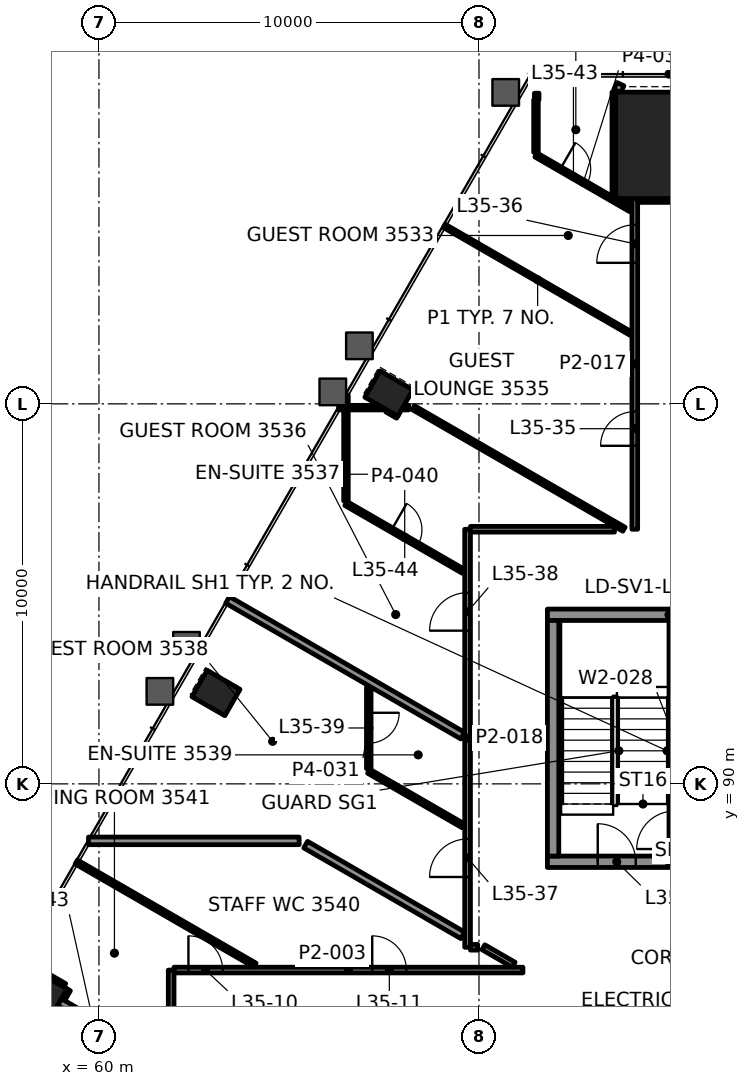
"""IFC4 building model, lengths in metres.
Left out: names, types, materials, properties, quantities, classifications, styles, units other than length and angle.
Written with IfcOpenShell. Run it as: python <this file> out.ifc"""

import sys

from ifc_helpers import new_model, si_unit, direction, frame, frame_2d, origin, origin_2d, place, context, subcontext, project, spatial, rectangle, hollow_rectangle, extrude, element, fill, save


model = new_model("IFC4")
c1 = context("Model", 3, precision=1e-05, world=origin(), true_north=direction((0.0, 1.0)))
c2 = subcontext(c1, "Body", "Model", "MODEL_VIEW")
j1 = project(units=[si_unit("LENGTHUNIT", "METRE"), si_unit("PLANEANGLEUNIT", "RADIAN")], contexts=[c1])
p1 = place(None, origin())
s1 = spatial("IfcSite", under=j1, at=p1, CompositionType="ELEMENT")
p2 = place(p1, origin())
s2 = spatial("IfcBuilding", under=s1, at=p2, CompositionType="ELEMENT")
p3 = place(p2, frame((0.0, 0.0, 155.8)))
s3 = spatial("IfcBuildingStorey", under=s2, at=p3, CompositionType="ELEMENT", Elevation=155.8)
p4 = place(p3, frame((75.0, 106.802, 0.0), z_axis=(0.0, 0.0, 1.0), x_axis=(-1.0, 0.0, 0.0)))
e1 = element("IfcColumn", 1, at=p4, inside=s3, PredefinedType="COLUMN", context=c2, shape_type="SweptSolid", body=[
    extrude(rectangle(XDim=2.8, YDim=2.8, at=origin_2d()), origin(), (0.0, 0.0, 1.0), 3.9),
])
for number, where, z_axis, x_axis in (
    (2, (67.629, 100.271, -0.0), (0.0, 0.0, 1.0), (-0.5, -0.866, 0.0)),
    (3, (63.079, 92.39, -0.0), (0.0, 0.0, 1.0), (-0.5, -0.866, 0.0)),
    (4, (58.53, 84.509, -0.0), (0.0, 0.0, 1.0), (-0.5, -0.866, 0.0)),
):
    element("IfcColumn", number, at=place(p3, frame(where, z_axis=z_axis, x_axis=x_axis)), inside=s3, PredefinedType="COLUMN", context=c2, shape_type="SweptSolid", body=[
        extrude(hollow_rectangle(XDim=0.8, YDim=1.0, WallThickness=0.05, at=origin_2d()), origin(), (0.0, 0.0, 1.0), 3.9),
    ])
p5 = place(p3, frame((71.8, 87.95, 0.0), z_axis=(0.0, 0.0, 1.0), x_axis=(1.0, 0.0, 0.0)))
e5 = element("IfcWall", 5, at=p5, inside=s3, PredefinedType="SHEAR", context=c2, shape_type="SweptSolid", body=[
    extrude(rectangle(XDim=6.4, YDim=0.3, at=frame_2d((3.2, 0.0))), origin(), (0.0, 0.0, 1.0), 3.7),
])
p6 = place(p5, frame((1.325, 0.0, 0.0)))
e6 = element("IfcOpeningElement", 6, at=p6, cuts=e5, PredefinedType="OPENING", context=c2, shape_type="SweptSolid", body=[
    extrude(rectangle(XDim=1.0, YDim=2.1, at=frame_2d((0.5, 1.05))), frame((0.0, 0.16, 0.0), z_axis=(0.0, -1.0, 0.0), x_axis=(1.0, 0.0, 0.0)), (0.0, 0.0, 1.0), 0.32),
])
p7 = place(p5, frame((4.125, 0.0, 0.0)))
e7 = element("IfcOpeningElement", 7, at=p7, cuts=e5, PredefinedType="OPENING", context=c2, shape_type="SweptSolid", body=[
    extrude(rectangle(XDim=1.2, YDim=2.1, at=frame_2d((0.6, 1.05))), frame((0.0, 0.16, 0.0), z_axis=(0.0, -1.0, 0.0), x_axis=(1.0, 0.0, 0.0)), (0.0, 0.0, 1.0), 0.32),
])
p8 = place(p3, frame((71.8, 94.45, 0.0), z_axis=(0.0, 0.0, 1.0), x_axis=(1.0, 0.0, 0.0)))
e8 = element("IfcWall", 8, at=p8, inside=s3, PredefinedType="SHEAR", context=c2, shape_type="SweptSolid", body=[
    extrude(rectangle(XDim=6.4, YDim=0.3, at=frame_2d((3.2, 0.0))), origin(), (0.0, 0.0, 1.0), 3.7),
])
p9 = place(p3, frame((71.95, 88.1, 0.0), z_axis=(0.0, 0.0, 1.0), x_axis=(0.0, 1.0, 0.0)))
e9 = element("IfcWall", 9, at=p9, inside=s3, PredefinedType="SHEAR", context=c2, shape_type="SweptSolid", body=[
    extrude(rectangle(XDim=6.2, YDim=0.3, at=frame_2d((3.1, 0.0))), origin(), (0.0, 0.0, 1.0), 3.7),
])
p10 = place(p3, frame((75.15, 88.1, 0.0), z_axis=(0.0, 0.0, 1.0), x_axis=(0.0, 1.0, 0.0)))
e10 = element("IfcWall", 10, at=p10, inside=s3, PredefinedType="SHEAR", context=c2, shape_type="SweptSolid", body=[
    extrude(rectangle(XDim=6.2, YDim=0.3, at=frame_2d((3.1, 0.0))), origin(), (0.0, 0.0, 1.0), 3.7),
])
p11 = place(p10, frame((0.185, 0.0, 0.0)))
e11 = element("IfcOpeningElement", 11, at=p11, cuts=e10, PredefinedType="OPENING", context=c2, shape_type="SweptSolid", body=[
    extrude(rectangle(XDim=1.0, YDim=2.1, at=frame_2d((0.5, 1.05))), frame((0.0, 0.16, 0.0), z_axis=(0.0, -1.0, 0.0), x_axis=(1.0, 0.0, 0.0)), (0.0, 0.0, 1.0), 0.32),
])
p12 = place(p3, frame((61.975, 85.1, 0.0), z_axis=(0.0, 0.0, 1.0), x_axis=(1.0, 0.0, 0.0)))
e12 = element("IfcWall", 12, at=p12, inside=s3, PredefinedType="PARTITIONING", context=c2, shape_type="SweptSolid", body=[
    extrude(rectangle(XDim=9.181, YDim=0.15, at=frame_2d((4.591, 0.0))), origin(), (0.0, 0.0, 1.0), 3.1),
])
p13 = place(p12, frame((0.38, 0.0, 0.0)))
e13 = element("IfcOpeningElement", 13, at=p13, cuts=e12, PredefinedType="OPENING", context=c2, shape_type="SweptSolid", body=[
    extrude(rectangle(XDim=0.9, YDim=2.1, at=frame_2d((0.45, 1.05))), frame((0.0, 0.085, 0.0), z_axis=(0.0, -1.0, 0.0), x_axis=(1.0, 0.0, 0.0)), (0.0, 0.0, 1.0), 0.17),
])
p14 = place(p12, frame((5.216, 0.0, 0.0)))
e14 = element("IfcOpeningElement", 14, at=p14, cuts=e12, PredefinedType="OPENING", context=c2, shape_type="SweptSolid", body=[
    extrude(rectangle(XDim=0.9, YDim=2.1, at=frame_2d((0.45, 1.05))), frame((0.0, 0.085, 0.0), z_axis=(0.0, -1.0, 0.0), x_axis=(1.0, 0.0, 0.0)), (0.0, 0.0, 1.0), 0.17),
])
p15 = place(p3, frame((69.775, 85.7, 0.0), z_axis=(0.0, 0.0, 1.0), x_axis=(1.0, 0.0, 0.0)))
e15 = element("IfcWall", 15, at=p15, inside=s3, PredefinedType="PARTITIONING", context=c2, shape_type="SweptSolid", body=[
    extrude(rectangle(XDim=0.192, YDim=0.15, at=frame_2d((0.096, 0.0))), origin(), (0.0, 0.0, 1.0), 3.1),
])
p16 = place(p3, frame((59.725, 88.5, 0.0), z_axis=(0.0, 0.0, 1.0), x_axis=(1.0, 0.0, 0.0)))
e16 = element("IfcWall", 16, at=p16, inside=s3, PredefinedType="PARTITIONING", context=c2, shape_type="SweptSolid", body=[
    extrude(rectangle(XDim=5.542, YDim=0.2, at=frame_2d((2.771, 0.0))), origin(), (0.0, 0.0, 1.0), 2.865),
])
p17 = place(p3, frame((69.775, 96.7, 0.0), z_axis=(0.0, 0.0, 1.0), x_axis=(1.0, 0.0, 0.0)))
e17 = element("IfcWall", 17, at=p17, inside=s3, PredefinedType="PARTITIONING", context=c2, shape_type="SweptSolid", body=[
    extrude(rectangle(XDim=3.79, YDim=0.15, at=frame_2d((1.895, 0.0))), origin(), (0.0, 0.0, 1.0), 3.1),
])
p18 = place(p3, frame((66.307, 99.9, 0.0), z_axis=(0.0, 0.0, 1.0), x_axis=(1.0, 0.0, 0.0)))
e18 = element("IfcWall", 18, at=p18, inside=s3, PredefinedType="PARTITIONING", context=c2, shape_type="SweptSolid", body=[
    extrude(rectangle(XDim=1.165, YDim=0.12, at=frame_2d((0.583, 0.0))), origin(), (0.0, 0.0, 1.0), 2.865),
])
p19 = place(p3, frame((67.993, 99.9, 0.0), z_axis=(0.0, 0.0, 1.0), x_axis=(1.0, 0.0, 0.0)))
e19 = element("IfcWall", 19, at=p19, inside=s3, PredefinedType="PARTITIONING", context=c2, shape_type="SweptSolid", body=[
    extrude(rectangle(XDim=0.159, YDim=0.12, at=frame_2d((0.08, 0.0))), origin(), (0.0, 0.0, 1.0), 3.1),
])
p20 = place(p3, frame((73.781, 105.402, 0.0), z_axis=(0.0, 0.0, 1.0), x_axis=(1.0, 0.0, 0.0)))
e20 = element("IfcWall", 20, at=p20, inside=s3, PredefinedType="PARTITIONING", context=c2, shape_type="SweptSolid", body=[
    extrude(rectangle(XDim=0.244, YDim=0.2, at=frame_2d((0.122, 0.0))), origin(), (0.0, 0.0, 1.0), 3.1),
])
p21 = place(p3, frame((59.017, 84.355, 0.0), z_axis=(0.0, 0.0, 1.0), x_axis=(0.500038750527, 0.866003030001, 0.0)))
e21 = element("IfcWall", 21, at=p21, inside=s3, PredefinedType="PARTITIONING", context=c2, shape_type="SweptSolid", body=[
    extrude(rectangle(XDim=0.29, YDim=0.2, at=frame_2d((0.145, 0.0))), origin(), (0.0, 0.0, 1.0), 3.1),
])
p22 = place(p3, frame((73.723, 108.413, 0.0), z_axis=(0.0, 0.0, 1.0), x_axis=(-0.427657527618, -0.903940838259, 0.0)))
e22 = element("IfcWall", 22, at=p22, inside=s3, PredefinedType="PARTITIONING", context=c2, shape_type="SweptSolid", body=[
    extrude(rectangle(XDim=0.196, YDim=0.2, at=frame_2d((0.098, 0.0))), origin(), (0.0, 0.0, 1.0), 3.1),
])
p23 = place(p3, frame((74.1, 96.7, 0.0), z_axis=(0.0, 0.0, 1.0), x_axis=(0.0, 1.0, 0.0)))
e23 = element("IfcWall", 23, at=p23, inside=s3, PredefinedType="PARTITIONING", context=c2, shape_type="SweptSolid", body=[
    extrude(rectangle(XDim=8.702, YDim=0.15, at=frame_2d((4.351, 0.0))), origin(), (0.0, 0.0, 1.0), 3.1),
])
p24 = place(p23, frame((2.196, 0.0, 0.0)))
e24 = element("IfcOpeningElement", 24, at=p24, cuts=e23, PredefinedType="OPENING", context=c2, shape_type="SweptSolid", body=[
    extrude(rectangle(XDim=0.9, YDim=2.1, at=frame_2d((0.45, 1.05))), frame((0.0, 0.085, 0.0), z_axis=(0.0, -1.0, 0.0), x_axis=(1.0, 0.0, 0.0)), (0.0, 0.0, 1.0), 0.17),
])
p25 = place(p23, frame((7.011, 0.0, 0.0)))
e25 = element("IfcOpeningElement", 25, at=p25, cuts=e23, PredefinedType="OPENING", context=c2, shape_type="SweptSolid", body=[
    extrude(rectangle(XDim=1.0, YDim=2.1, at=frame_2d((0.5, 1.05))), frame((0.0, 0.085, 0.0), z_axis=(0.0, -1.0, 0.0), x_axis=(1.0, 0.0, 0.0)), (0.0, 0.0, 1.0), 0.17),
])
p26 = place(p3, frame((73.6, 105.472, 0.0), z_axis=(0.0, 0.0, 1.0), x_axis=(0.0, 1.0, 0.0)))
e26 = element("IfcWall", 26, at=p26, inside=s3, PredefinedType="PARTITIONING", context=c2, shape_type="SweptSolid", body=[
    extrude(rectangle(XDim=2.729, YDim=0.2, at=frame_2d((1.365, 0.0))), origin(), (0.0, 0.0, 1.0), 3.1),
])
p27 = place(p3, frame((71.519, 108.002, 0.0), z_axis=(0.0, 0.0, 1.0), x_axis=(0.0, 1.0, 0.0)))
e27 = element("IfcWall", 27, at=p27, inside=s3, PredefinedType="PARTITIONING", context=c2, shape_type="SweptSolid", body=[
    extrude(rectangle(XDim=0.173, YDim=0.12, at=frame_2d((0.086, 0.0))), origin(), (0.0, 0.0, 1.0), 3.1),
])
p28 = place(p3, frame((71.5, 106.618, 0.0), z_axis=(0.0, 0.0, 1.0), x_axis=(0.0, 1.0, 0.0)))
e28 = element("IfcWall", 28, at=p28, inside=s3, PredefinedType="PARTITIONING", context=c2, shape_type="SweptSolid", body=[
    extrude(rectangle(XDim=1.384, YDim=0.12, at=frame_2d((0.692, 0.0))), origin(), (0.0, 0.0, 1.0), 3.1),
])
p29 = place(p3, frame((69.7, 85.7, 0.0), z_axis=(0.0, 0.0, 1.0), x_axis=(0.0, 1.0, 0.0)))
e29 = element("IfcWall", 29, at=p29, inside=s3, PredefinedType="PARTITIONING", context=c2, shape_type="SweptSolid", body=[
    extrude(rectangle(XDim=11.0, YDim=0.15, at=frame_2d((5.5, 0.0))), origin(), (0.0, 0.0, 1.0), 3.022),
])
p30 = place(p29, frame((1.849, 0.0, 0.0)))
e30 = element("IfcOpeningElement", 30, at=p30, cuts=e29, PredefinedType="OPENING", context=c2, shape_type="SweptSolid", body=[
    extrude(rectangle(XDim=1.0, YDim=2.1, at=frame_2d((0.5, 1.05))), frame((0.0, 0.085, 0.0), z_axis=(0.0, -1.0, 0.0), x_axis=(1.0, 0.0, 0.0)), (0.0, 0.0, 1.0), 0.17),
])
p31 = place(p29, frame((8.332, 0.0, 0.0)))
e31 = element("IfcOpeningElement", 31, at=p31, cuts=e29, PredefinedType="OPENING", context=c2, shape_type="SweptSolid", body=[
    extrude(rectangle(XDim=1.0, YDim=2.1, at=frame_2d((0.5, 1.05))), frame((0.0, 0.085, 0.0), z_axis=(0.0, -1.0, 0.0), x_axis=(1.0, 0.0, 0.0)), (0.0, 0.0, 1.0), 0.17),
])
p32 = place(p3, frame((67.1, 92.54, 0.0), z_axis=(0.0, 0.0, 1.0), x_axis=(0.0, -1.0, 0.0)))
e32 = element("IfcWall", 32, at=p32, inside=s3, PredefinedType="PARTITIONING", context=c2, shape_type="SweptSolid", body=[
    extrude(rectangle(XDim=2.139, YDim=0.12, at=frame_2d((1.07, 0.0))), origin(), (0.0, 0.0, 1.0), 3.1),
])
p33 = place(p32, frame((0.67, 0.0, 0.0)))
e33 = element("IfcOpeningElement", 33, at=p33, cuts=e32, PredefinedType="OPENING", context=c2, shape_type="SweptSolid", body=[
    extrude(rectangle(XDim=0.8, YDim=2.1, at=frame_2d((0.4, 1.05))), frame((0.0, 0.07, 0.0), z_axis=(0.0, -1.0, 0.0), x_axis=(1.0, 0.0, 0.0)), (0.0, 0.0, 1.0), 0.14),
])
p34 = place(p3, frame((66.5, 97.446, 0.0), z_axis=(0.0, 0.0, 1.0), x_axis=(0.0, 1.0, 0.0)))
e34 = element("IfcWall", 34, at=p34, inside=s3, PredefinedType="PARTITIONING", context=c2, shape_type="SweptSolid", body=[
    extrude(rectangle(XDim=2.789, YDim=0.12, at=frame_2d((1.394, 0.0))), origin(), (0.0, 0.0, 1.0), 2.865),
])
p35 = place(p3, frame((61.9, 68.476, 0.0), z_axis=(0.0, 0.0, 1.0), x_axis=(0.0, 1.0, 0.0)))
e35 = element("IfcWall", 35, at=p35, inside=s3, PredefinedType="PARTITIONING", context=c2, shape_type="SweptSolid", body=[
    extrude(rectangle(XDim=16.624, YDim=0.15, at=frame_2d((8.312, 0.0))), origin(), (0.0, 0.0, 1.0), 3.1),
])
p36 = place(p35, frame((9.043, 0.0, 0.0)))
e36 = element("IfcOpeningElement", 36, at=p36, cuts=e35, PredefinedType="OPENING", context=c2, shape_type="SweptSolid", body=[
    extrude(rectangle(XDim=1.0, YDim=2.1, at=frame_2d((0.5, 1.05))), frame((0.0, 0.085, 0.0), z_axis=(0.0, -1.0, 0.0), x_axis=(1.0, 0.0, 0.0)), (0.0, 0.0, 1.0), 0.17),
])
p37 = place(p3, frame((71.5, 106.549, 0.0), z_axis=(0.0, 0.0, 1.0), x_axis=(0.86598763626, -0.500065409566, 0.0)))
e37 = element("IfcWall", 37, at=p37, inside=s3, PredefinedType="PARTITIONING", context=c2, shape_type="SweptSolid", body=[
    extrude(rectangle(XDim=2.875, YDim=0.12, at=frame_2d((1.438, 0.0))), origin(), (0.0, 0.0, 1.0), 3.1),
])
p38 = place(p37, frame((0.738, 0.0, 0.0)))
e38 = element("IfcOpeningElement", 38, at=p38, cuts=e37, PredefinedType="OPENING", context=c2, shape_type="SweptSolid", body=[
    extrude(rectangle(XDim=0.8, YDim=2.1, at=frame_2d((0.4, 1.05))), frame((0.0, 0.07, 0.0), z_axis=(0.0, -1.0, 0.0), x_axis=(1.0, 0.0, 0.0)), (0.0, 0.0, 1.0), 0.14),
])
p39 = place(p3, frame((73.999, 101.847, 0.0), z_axis=(0.0, 0.0, 1.0), x_axis=(-0.866024993943, 0.500000709865, 0.0)))
e39 = element("IfcWall", 39, at=p39, inside=s3, PredefinedType="PARTITIONING", context=c2, shape_type="SweptSolid", body=[
    extrude(rectangle(XDim=5.671, YDim=0.1, at=frame_2d((2.835, 0.0))), origin(), (0.0, 0.0, 1.0), 3.1),
])
p40 = place(p3, frame((73.814, 96.7, 0.0), z_axis=(0.0, 0.0, 1.0), x_axis=(-0.866025499775, 0.499999833739, 0.0)))
e40 = element("IfcWall", 40, at=p40, inside=s3, PredefinedType="PARTITIONING", context=c2, shape_type="SweptSolid", body=[
    extrude(rectangle(XDim=6.4, YDim=0.12, at=frame_2d((3.2, 0.0))), origin(), (0.0, 0.0, 1.0), 3.1),
])
p41 = place(p3, frame((67.863, 99.675, 0.0), z_axis=(0.0, 0.0, 1.0), x_axis=(-0.865964461276, 0.500105540669, 0.0)))
e41 = element("IfcWall", 41, at=p41, inside=s3, PredefinedType="PARTITIONING", context=c2, shape_type="SweptSolid", body=[
    extrude(rectangle(XDim=0.331, YDim=0.12, at=frame_2d((0.166, 0.0))), origin(), (0.0, 0.0, 1.0), 3.1),
])
p42 = place(p3, frame((66.5, 97.377, 0.0), z_axis=(0.0, 0.0, 1.0), x_axis=(0.866028357664, -0.499994883695, 0.0)))
e42 = element("IfcWall", 42, at=p42, inside=s3, PredefinedType="PARTITIONING", context=c2, shape_type="SweptSolid", body=[
    extrude(rectangle(XDim=3.568, YDim=0.12, at=frame_2d((1.784, 0.0))), origin(), (0.0, 0.0, 1.0), 3.1),
])
p43 = place(p42, frame((1.384, 0.0, 0.0)))
e43 = element("IfcOpeningElement", 43, at=p43, cuts=e42, PredefinedType="OPENING", context=c2, shape_type="SweptSolid", body=[
    extrude(rectangle(XDim=0.8, YDim=2.1, at=frame_2d((0.4, 1.05))), frame((0.0, 0.07, 0.0), z_axis=(0.0, -1.0, 0.0), x_axis=(1.0, 0.0, 0.0)), (0.0, 0.0, 1.0), 0.14),
])
p44 = place(p3, frame((69.573, 91.268, 0.0), z_axis=(0.0, 0.0, 1.0), x_axis=(-0.866030807744, 0.499990639951, 0.0)))
e44 = element("IfcWall", 44, at=p44, inside=s3, PredefinedType="PARTITIONING", context=c2, shape_type="SweptSolid", body=[
    extrude(rectangle(XDim=7.145, YDim=0.2, at=frame_2d((3.572, 0.0))), origin(), (0.0, 0.0, 1.0), 2.865),
])
p45 = place(p3, frame((69.59, 88.893, 0.0), z_axis=(0.0, 0.0, 1.0), x_axis=(-0.86598763626, 0.500065409566, 0.0)))
e45 = element("IfcWall", 45, at=p45, inside=s3, PredefinedType="PARTITIONING", context=c2, shape_type="SweptSolid", body=[
    extrude(rectangle(XDim=2.875, YDim=0.12, at=frame_2d((1.438, 0.0))), origin(), (0.0, 0.0, 1.0), 3.1),
])
p46 = place(p3, frame((70.914, 85.24, 0.0), z_axis=(0.0, 0.0, 1.0), x_axis=(-0.865898279276, 0.500220121494, 0.0)))
e46 = element("IfcWall", 46, at=p46, inside=s3, PredefinedType="PARTITIONING", context=c2, shape_type="SweptSolid", body=[
    extrude(rectangle(XDim=0.92, YDim=0.15, at=frame_2d((0.46, 0.0))), origin(), (0.0, 0.0, 1.0), 3.1),
])
p47 = place(p3, frame((69.573, 86.014, 0.0), z_axis=(0.0, 0.0, 1.0), x_axis=(-0.866008358604, 0.500029521957, 0.0)))
e47 = element("IfcWall", 47, at=p47, inside=s3, PredefinedType="PARTITIONING", context=c2, shape_type="SweptSolid", body=[
    extrude(rectangle(XDim=4.772, YDim=0.2, at=frame_2d((2.386, 0.0))), origin(), (0.0, 0.0, 1.0), 3.1),
])
p48 = place(p3, frame((64.106, 85.23, 0.0), z_axis=(0.0, 0.0, 1.0), x_axis=(-0.866029080648, 0.499993631431, 0.0)))
e48 = element("IfcWall", 48, at=p48, inside=s3, PredefinedType="PARTITIONING", context=c2, shape_type="SweptSolid", body=[
    extrude(rectangle(XDim=5.429, YDim=0.12, at=frame_2d((2.715, 0.0))), origin(), (0.0, 0.0, 1.0), 2.865),
])
p49 = place(p3, frame((59.075, 84.656, 0.0), z_axis=(0.0, 0.0, 1.0), x_axis=(-0.866063163075, 0.499934593286, 0.0)))
e49 = element("IfcWall", 49, at=p49, inside=s3, PredefinedType="PARTITIONING", context=c2, shape_type="SweptSolid", body=[
    extrude(rectangle(XDim=0.664, YDim=0.2, at=frame_2d((0.332, 0.0))), origin(), (0.0, 0.0, 1.0), 2.865),
])
p50 = place(p3, frame((61.773, 82.637, 0.0), z_axis=(0.0, 0.0, 1.0), x_axis=(-0.866059071022, 0.4999416821, 0.0)))
e50 = element("IfcWall", 50, at=p50, inside=s3, PredefinedType="PARTITIONING", context=c2, shape_type="SweptSolid", body=[
    extrude(rectangle(XDim=3.246, YDim=0.2, at=frame_2d((1.623, 0.0))), origin(), (0.0, 0.0, 1.0), 3.1),
])
p51 = place(p3, frame((74.175, 105.402, 0.0), z_axis=(0.0, 0.0, 1.0), x_axis=(1.0, 0.0, 0.0)))
e51 = element("IfcWall", 51, at=p51, inside=s3, PredefinedType="PARTITIONING", context=c2, shape_type="SweptSolid", body=[
    extrude(rectangle(XDim=1.649, YDim=0.2, at=frame_2d((0.825, 0.0))), origin(), (0.0, 0.0, 1.0), 3.097),
])
p52 = place(p13, origin())
e52 = element("IfcDoor", 52, at=p52, inside=s3, OperationType="SINGLE_SWING_RIGHT", PredefinedType="DOOR", context=c2, shape_type="SweptSolid", body=[
    extrude(rectangle(XDim=0.9, YDim=2.1, at=frame_2d((0.45, 1.05))), frame((0.0, 0.025, 0.0), z_axis=(0.0, -1.0, 0.0), x_axis=(1.0, 0.0, 0.0)), (0.0, 0.0, 1.0), 0.05),
])
fill(e13, e52)
p53 = place(p14, origin())
e53 = element("IfcDoor", 53, at=p53, inside=s3, OperationType="SINGLE_SWING_LEFT", PredefinedType="DOOR", context=c2, shape_type="SweptSolid", body=[
    extrude(rectangle(XDim=0.9, YDim=2.1, at=frame_2d((0.45, 1.05))), frame((0.0, 0.025, 0.0), z_axis=(0.0, -1.0, 0.0), x_axis=(1.0, 0.0, 0.0)), (0.0, 0.0, 1.0), 0.05),
])
fill(e14, e53)
p54 = place(p24, origin())
e54 = element("IfcDoor", 54, at=p54, inside=s3, OperationType="SINGLE_SWING_RIGHT", PredefinedType="DOOR", context=c2, shape_type="SweptSolid", body=[
    extrude(rectangle(XDim=0.9, YDim=2.1, at=frame_2d((0.45, 1.05))), frame((0.0, 0.025, 0.0), z_axis=(0.0, -1.0, 0.0), x_axis=(1.0, 0.0, 0.0)), (0.0, 0.0, 1.0), 0.05),
])
fill(e24, e54)
p55 = place(p25, origin())
e55 = element("IfcDoor", 55, at=p55, inside=s3, OperationType="SINGLE_SWING_RIGHT", PredefinedType="DOOR", context=c2, shape_type="SweptSolid", body=[
    extrude(rectangle(XDim=1.0, YDim=2.1, at=frame_2d((0.5, 1.05))), frame((0.0, 0.025, 0.0), z_axis=(0.0, -1.0, 0.0), x_axis=(1.0, 0.0, 0.0)), (0.0, 0.0, 1.0), 0.05),
])
fill(e25, e55)
p56 = place(p30, origin())
e56 = element("IfcDoor", 56, at=p56, inside=s3, OperationType="SINGLE_SWING_LEFT", PredefinedType="DOOR", context=c2, shape_type="SweptSolid", body=[
    extrude(rectangle(XDim=1.0, YDim=2.1, at=frame_2d((0.5, 1.05))), frame((0.0, 0.025, 0.0), z_axis=(0.0, -1.0, 0.0), x_axis=(1.0, 0.0, 0.0)), (0.0, 0.0, 1.0), 0.05),
])
fill(e30, e56)
p57 = place(p31, origin())
e57 = element("IfcDoor", 57, at=p57, inside=s3, OperationType="SINGLE_SWING_LEFT", PredefinedType="DOOR", context=c2, shape_type="SweptSolid", body=[
    extrude(rectangle(XDim=1.0, YDim=2.1, at=frame_2d((0.5, 1.05))), frame((0.0, 0.025, 0.0), z_axis=(0.0, -1.0, 0.0), x_axis=(1.0, 0.0, 0.0)), (0.0, 0.0, 1.0), 0.05),
])
fill(e31, e57)
p58 = place(p33, origin())
e58 = element("IfcDoor", 58, at=p58, inside=s3, OperationType="SINGLE_SWING_LEFT", PredefinedType="DOOR", context=c2, shape_type="SweptSolid", body=[
    extrude(rectangle(XDim=0.8, YDim=2.1, at=frame_2d((0.4, 1.05))), frame((0.0, 0.025, 0.0), z_axis=(0.0, -1.0, 0.0), x_axis=(1.0, 0.0, 0.0)), (0.0, 0.0, 1.0), 0.05),
])
fill(e33, e58)
p59 = place(p38, origin())
e59 = element("IfcDoor", 59, at=p59, inside=s3, OperationType="SINGLE_SWING_RIGHT", PredefinedType="DOOR", context=c2, shape_type="SweptSolid", body=[
    extrude(rectangle(XDim=0.8, YDim=2.1, at=frame_2d((0.4, 1.05))), frame((0.0, 0.025, 0.0), z_axis=(0.0, -1.0, 0.0), x_axis=(1.0, 0.0, 0.0)), (0.0, 0.0, 1.0), 0.05),
])
fill(e38, e59)
p60 = place(p43, origin())
e60 = element("IfcDoor", 60, at=p60, inside=s3, OperationType="SINGLE_SWING_LEFT", PredefinedType="DOOR", context=c2, shape_type="SweptSolid", body=[
    extrude(rectangle(XDim=0.8, YDim=2.1, at=frame_2d((0.4, 1.05))), frame((0.0, 0.025, 0.0), z_axis=(0.0, -1.0, 0.0), x_axis=(1.0, 0.0, 0.0)), (0.0, 0.0, 1.0), 0.05),
])
fill(e43, e60)
p61 = place(p3, origin())
p62 = place(p61, frame((69.818, 106.011, 0.15), z_axis=(0.0, 0.0, 1.0), x_axis=(-0.5, -0.866025, 0.0)))
p63 = place(p62, origin())
e61 = element("IfcWindow", 61, at=p63, inside=s3, PartitioningType="SINGLE_PANEL", PredefinedType="WINDOW", context=c2, shape_type="SweptSolid", body=[
    extrude(rectangle(XDim=2.958, YDim=3.55, at=frame_2d((1.479, 1.775))), frame((0.0, 0.03, 0.0), z_axis=(0.0, -1.0, 0.0), x_axis=(1.0, 0.0, 0.0)), (0.0, 0.0, 1.0), 0.06),
])
p64 = place(p6, origin())
e62 = element("IfcDoor", 62, at=p64, inside=s3, OperationType="SINGLE_SWING_RIGHT", PredefinedType="DOOR", context=c2, shape_type="SweptSolid", body=[
    extrude(rectangle(XDim=1.0, YDim=2.1, at=frame_2d((0.5, 1.05))), frame((0.0, 0.025, 0.0), z_axis=(0.0, -1.0, 0.0), x_axis=(1.0, 0.0, 0.0)), (0.0, 0.0, 1.0), 0.05),
])
fill(e6, e62)
save(model, sys.argv[1])
